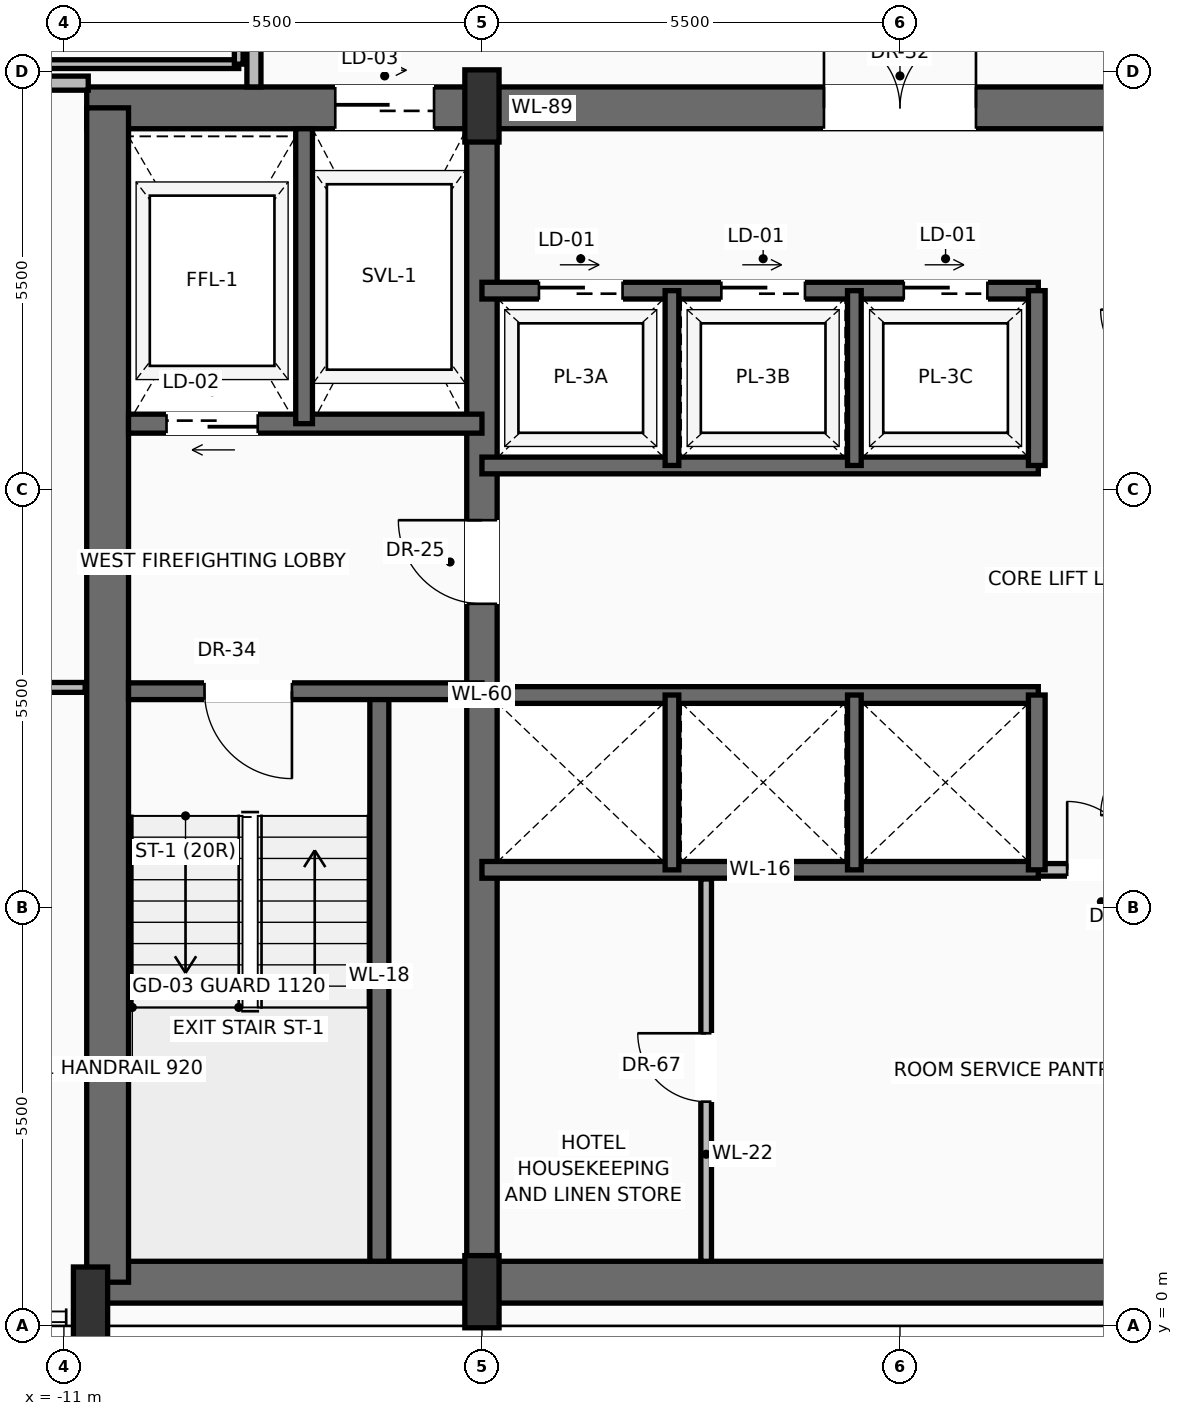
"""IFC4 building model, lengths in metres.
Left out: names, types, materials, properties, quantities, classifications, styles, units other than length and angle.
Written with IfcOpenShell. Run it as: python <this file> out.ifc"""

import sys

from ifc_helpers import new_model, si_unit, direction, frame, frame_2d, origin, origin_2d, place, context, subcontext, project, spatial, rectangle, extrude, source, transform, mapped, element, fill, save


model = new_model("IFC4")
c1 = context("Model", 3, precision=1e-05, world=origin(), true_north=direction((0.0, 1.0)))
c2 = subcontext(c1, "Body", "Model", "MODEL_VIEW")
j1 = project(units=[si_unit("LENGTHUNIT", "METRE"), si_unit("PLANEANGLEUNIT", "RADIAN")], contexts=[c1])
p1 = place(None, origin())
s1 = spatial("IfcSite", under=j1, at=p1, CompositionType="ELEMENT")
p2 = place(p1, origin())
s2 = spatial("IfcBuilding", under=s1, at=p2, CompositionType="ELEMENT")
p3 = place(p2, frame((0.0, 0.0, 220.0)))
s3 = spatial("IfcBuildingStorey", under=s2, at=p3, CompositionType="ELEMENT", Elevation=220.0)
p4 = place(p3, frame((-10.65, 0.575, 0.0), z_axis=(0.0, 0.0, 1.0), x_axis=(1.0, 0.0, 0.0)))
e1 = element("IfcWall", 1, at=p4, inside=s3, PredefinedType="SHEAR", context=c2, shape_type="SweptSolid", body=[
    extrude(rectangle(XDim=21.3, YDim=0.55, at=frame_2d((10.65, 0.0))), origin(), (0.0, 0.0, 1.0), 3.24),
])
p5 = place(p3, frame((-10.7, 16.025, 0.0), z_axis=(0.0, 0.0, 1.0), x_axis=(1.0, 0.0, 0.0)))
e2 = element("IfcWall", 2, at=p5, inside=s3, PredefinedType="SHEAR", context=c2, shape_type="SweptSolid", body=[
    extrude(rectangle(XDim=21.4, YDim=0.55, at=frame_2d((10.7, 0.0))), origin(), (0.0, 0.0, 1.0), 3.24),
])
p6 = place(p5, frame((3.27, 0.0, 0.0)))
e3 = element("IfcOpeningElement", 3, at=p6, cuts=e2, PredefinedType="OPENING", context=c2, shape_type="SweptSolid", body=[
    extrude(rectangle(XDim=1.3, YDim=2.3, at=frame_2d((0.65, 1.15))), frame((0.0, 0.285, 0.0), z_axis=(0.0, -1.0, 0.0), x_axis=(1.0, 0.0, 0.0)), (0.0, 0.0, 1.0), 0.57),
])
p7 = place(p5, frame((9.7, 0.0, 0.0)))
e4 = element("IfcOpeningElement", 4, at=p7, cuts=e2, PredefinedType="OPENING", context=c2, shape_type="SweptSolid", body=[
    extrude(rectangle(XDim=2.0, YDim=2.4, at=frame_2d((1.0, 1.2))), frame((0.0, 0.285, 0.0), z_axis=(0.0, -1.0, 0.0), x_axis=(1.0, 0.0, 0.0)), (0.0, 0.0, 1.0), 0.57),
])
p8 = place(p3, frame((-10.425, 0.575, 0.0), z_axis=(0.0, 0.0, 1.0), x_axis=(0.0, 1.0, 0.0)))
e5 = element("IfcWall", 5, at=p8, inside=s3, PredefinedType="SHEAR", context=c2, shape_type="SweptSolid", body=[
    extrude(rectangle(XDim=15.45, YDim=0.55, at=frame_2d((7.725, 0.0))), origin(), (0.0, 0.0, 1.0), 3.24),
])
p9 = place(p3, frame((-5.5, 0.575, 0.0), z_axis=(0.0, 0.0, 1.0), x_axis=(0.0, 1.0, 0.0)))
e6 = element("IfcWall", 6, at=p9, inside=s3, PredefinedType="SHEAR", context=c2, shape_type="SweptSolid", body=[
    extrude(rectangle(XDim=15.45, YDim=0.4, at=frame_2d((7.725, 0.0))), origin(), (0.0, 0.0, 1.0), 3.24),
])
p10 = place(p9, frame((8.925, 0.0, 0.0)))
e7 = element("IfcOpeningElement", 7, at=p10, cuts=e6, PredefinedType="OPENING", context=c2, shape_type="SweptSolid", body=[
    extrude(rectangle(XDim=1.1, YDim=2.2, at=frame_2d((0.55, 1.1))), frame((0.0, 0.21, 0.0), z_axis=(0.0, -1.0, 0.0), x_axis=(1.0, 0.0, 0.0)), (0.0, 0.0, 1.0), 0.42),
])
m1 = source(origin(), c2, "Body", "SweptSolid", [
    extrude(rectangle(XDim=0.45, YDim=0.95, at=origin_2d()), origin(), (0.0, 0.0, 1.0), 3.45),
])
for number, where, z_axis, x_axis in (
    (8, (-10.65, 0.3, 0.0), (0.0, 0.0, 1.0), (1.0, 0.0, 0.0)),
    (9, (-5.5, 0.45, 0.0), (0.0, 0.0, 1.0), (1.0, 0.0, 0.0)),
    (10, (-5.5, 16.05, 0.0), (0.0, 0.0, 1.0), (1.0, 0.0, 0.0)),
):
    element("IfcColumn", number, at=place(p3, frame(where, z_axis=z_axis, x_axis=x_axis)), inside=s3, PredefinedType="PILASTER", context=c2, shape_type="MappedRepresentation", body=[
        mapped(m1, transform((0.0, 0.0, 0.0), scale=1.0)),
    ])
p11 = place(p3, frame((-19.808, 15.546, 0.0), z_axis=(0.0, 0.0, 1.0), x_axis=(0.514354531287, 0.857577644382, 0.0)))
e11 = element("IfcWall", 11, at=p11, inside=s3, PredefinedType="SOLIDWALL", context=c2, shape_type="SweptSolid", body=[
    extrude(rectangle(XDim=19.322, YDim=0.28, at=frame_2d((9.661, 0.0))), origin(), (0.0, 0.0, 1.0), 2.82),
])
p12 = place(p11, frame((4.637, 0.0, 0.0)))
e12 = element("IfcOpeningElement", 12, at=p12, cuts=e11, PredefinedType="OPENING", context=c2, shape_type="SweptSolid", body=[
    extrude(rectangle(XDim=1.6, YDim=2.35, at=frame_2d((0.8, 1.175))), frame((0.0, 0.15, 0.0), z_axis=(0.0, -1.0, 0.0), x_axis=(1.0, 0.0, 0.0)), (0.0, 0.0, 1.0), 0.3),
])
p13 = place(p11, frame((13.139, 0.0, 0.9)))
e13 = element("IfcOpeningElement", 13, at=p13, cuts=e11, PredefinedType="OPENING", context=c2, shape_type="SweptSolid", body=[
    extrude(rectangle(XDim=2.0, YDim=1.75, at=frame_2d((1.0, 0.875))), frame((0.0, 0.15, 0.0), z_axis=(0.0, -1.0, 0.0), x_axis=(1.0, 0.0, 0.0)), (0.0, 0.0, 1.0), 0.3),
])
p14 = place(p3, frame((-6.85, 0.85, 0.0), z_axis=(0.0, 0.0, 1.0), x_axis=(0.0, 1.0, 0.0)))
e14 = element("IfcWall", 14, at=p14, inside=s3, PredefinedType="SOLIDWALL", context=c2, shape_type="SweptSolid", body=[
    extrude(rectangle(XDim=7.5, YDim=0.25, at=frame_2d((3.75, 0.0))), origin(), (0.0, 0.0, 1.0), 3.24),
])
p15 = place(p3, frame((-5.5, 8.35, 0.0), z_axis=(0.0, 0.0, 1.0), x_axis=(-1.0, 0.0, 0.0)))
e15 = element("IfcWall", 15, at=p15, inside=s3, PredefinedType="SOLIDWALL", context=c2, shape_type="SweptSolid", body=[
    extrude(rectangle(XDim=4.65, YDim=0.22, at=frame_2d((2.325, 0.0))), origin(), (0.0, 0.0, 1.0), 3.24),
])
p16 = place(p15, frame((2.5, 0.0, 0.0)))
e16 = element("IfcOpeningElement", 16, at=p16, cuts=e15, PredefinedType="OPENING", context=c2, shape_type="SweptSolid", body=[
    extrude(rectangle(XDim=1.15, YDim=2.2, at=frame_2d((0.575, 1.1))), frame((0.0, 0.12, 0.0), z_axis=(0.0, -1.0, 0.0), x_axis=(1.0, 0.0, 0.0)), (0.0, 0.0, 1.0), 0.24),
])
p17 = place(p3, frame((-5.5, 11.87, 0.0), z_axis=(0.0, 0.0, 1.0), x_axis=(-1.0, 0.0, 0.0)))
e17 = element("IfcWall", 17, at=p17, inside=s3, PredefinedType="SOLIDWALL", context=c2, shape_type="SweptSolid", body=[
    extrude(rectangle(XDim=4.65, YDim=0.25, at=frame_2d((2.325, 0.0))), origin(), (0.0, 0.0, 1.0), 3.24),
])
p18 = place(p17, frame((2.95, 0.0, 0.0)))
e18 = element("IfcOpeningElement", 18, at=p18, cuts=e17, PredefinedType="OPENING", context=c2, shape_type="SweptSolid", body=[
    extrude(rectangle(XDim=1.2, YDim=2.25, at=frame_2d((0.6, 1.125))), frame((0.0, 0.135, 0.0), z_axis=(0.0, -1.0, 0.0), x_axis=(1.0, 0.0, 0.0)), (0.0, 0.0, 1.0), 0.27),
])
p19 = place(p3, frame((-7.84, 11.87, 0.0), z_axis=(0.0, 0.0, 1.0), x_axis=(0.0, 1.0, 0.0)))
e19 = element("IfcWall", 19, at=p19, inside=s3, PredefinedType="SOLIDWALL", context=c2, shape_type="SweptSolid", body=[
    extrude(rectangle(XDim=3.88, YDim=0.22, at=frame_2d((1.94, 0.0))), origin(), (0.0, 0.0, 1.0), 3.24),
])
p20 = place(p3, frame((1.82, 6.0, 0.0), z_axis=(0.0, 0.0, 1.0), x_axis=(1.0, 0.0, 0.0)))
e20 = element("IfcWall", 20, at=p20, inside=s3, PredefinedType="PARTITIONING", context=c2, shape_type="SweptSolid", body=[
    extrude(rectangle(XDim=3.48, YDim=0.165, at=frame_2d((1.74, 0.0))), origin(), (0.0, 0.0, 1.0), 3.232),
])
p21 = place(p20, frame((0.38, 0.0, 0.0)))
e21 = element("IfcOpeningElement", 21, at=p21, cuts=e20, PredefinedType="OPENING", context=c2, shape_type="SweptSolid", body=[
    extrude(rectangle(XDim=0.9, YDim=2.1, at=frame_2d((0.45, 1.05))), frame((0.0, 0.093, 0.0), z_axis=(0.0, -1.0, 0.0), x_axis=(1.0, 0.0, 0.0)), (0.0, 0.0, 1.0), 0.185),
])
p22 = place(p3, frame((-2.55, 0.85, 0.0), z_axis=(0.0, 0.0, 1.0), x_axis=(0.0, 1.0, 0.0)))
e22 = element("IfcWall", 22, at=p22, inside=s3, PredefinedType="PARTITIONING", context=c2, shape_type="SweptSolid", body=[
    extrude(rectangle(XDim=5.03, YDim=0.14, at=frame_2d((2.515, 0.0))), origin(), (0.0, 0.0, 1.0), 3.232),
])
p23 = place(p22, frame((2.1, 0.0, 0.0)))
e23 = element("IfcOpeningElement", 23, at=p23, cuts=e22, PredefinedType="OPENING", context=c2, shape_type="SweptSolid", body=[
    extrude(rectangle(XDim=0.9, YDim=2.1, at=frame_2d((0.45, 1.05))), frame((0.0, 0.08, 0.0), z_axis=(0.0, -1.0, 0.0), x_axis=(1.0, 0.0, 0.0)), (0.0, 0.0, 1.0), 0.16),
])
for number, where, z_axis, x_axis in (
    (24, (-5.5, 6.0, 0.0), (0.0, 0.0, 1.0), (1.0, 0.0, 0.0)),
    (25, (-5.5, 8.3, 0.0), (0.0, 0.0, 1.0), (1.0, 0.0, 0.0)),
):
    element("IfcWall", number, at=place(p3, frame(where, z_axis=z_axis, x_axis=x_axis)), inside=s3, PredefinedType="SOLIDWALL", context=c2, shape_type="SweptSolid", body=[
        extrude(rectangle(XDim=7.32, YDim=0.22, at=frame_2d((3.66, 0.0))), origin(), (0.0, 0.0, 1.0), 3.24),
    ])
p24 = place(p3, frame((1.8, 6.0, 0.0), z_axis=(0.0, 0.0, 1.0), x_axis=(0.0, 1.0, 0.0)))
e26 = element("IfcWall", 26, at=p24, inside=s3, PredefinedType="SOLIDWALL", context=c2, shape_type="SweptSolid", body=[
    extrude(rectangle(XDim=2.3, YDim=0.22, at=frame_2d((1.15, 0.0))), origin(), (0.0, 0.0, 1.0), 3.24),
])
for number, where, z_axis, x_axis in (
    (27, (-3.0, 6.0, 0.0), (0.0, 0.0, 1.0), (0.0, 1.0, 0.0)),
    (28, (-0.6, 6.0, 0.0), (0.0, 0.0, 1.0), (0.0, 1.0, 0.0)),
):
    element("IfcWall", number, at=place(p3, frame(where, z_axis=z_axis, x_axis=x_axis)), inside=s3, PredefinedType="SOLIDWALL", context=c2, shape_type="SweptSolid", body=[
        extrude(rectangle(XDim=2.3, YDim=0.18, at=frame_2d((1.15, 0.0))), origin(), (0.0, 0.0, 1.0), 3.24),
    ])
p25 = place(p3, frame((-5.5, 11.32, 0.0), z_axis=(0.0, 0.0, 1.0), x_axis=(1.0, 0.0, 0.0)))
e29 = element("IfcWall", 29, at=p25, inside=s3, PredefinedType="SOLIDWALL", context=c2, shape_type="SweptSolid", body=[
    extrude(rectangle(XDim=7.32, YDim=0.22, at=frame_2d((3.66, 0.0))), origin(), (0.0, 0.0, 1.0), 3.24),
])
p26 = place(p3, frame((-5.5, 13.62, 0.0), z_axis=(0.0, 0.0, 1.0), x_axis=(1.0, 0.0, 0.0)))
e30 = element("IfcWall", 30, at=p26, inside=s3, PredefinedType="SOLIDWALL", context=c2, shape_type="SweptSolid", body=[
    extrude(rectangle(XDim=7.32, YDim=0.22, at=frame_2d((3.66, 0.0))), origin(), (0.0, 0.0, 1.0), 3.24),
])
p27 = place(p26, frame((0.75, 0.0, 0.0)))
e31 = element("IfcOpeningElement", 31, at=p27, cuts=e30, PredefinedType="OPENING", context=c2, shape_type="SweptSolid", body=[
    extrude(rectangle(XDim=1.1, YDim=2.2, at=frame_2d((0.55, 1.1))), frame((0.0, 0.12, 0.0), z_axis=(0.0, -1.0, 0.0), x_axis=(1.0, 0.0, 0.0)), (0.0, 0.0, 1.0), 0.24),
])
p28 = place(p26, frame((3.15, 0.0, 0.0)))
e32 = element("IfcOpeningElement", 32, at=p28, cuts=e30, PredefinedType="OPENING", context=c2, shape_type="SweptSolid", body=[
    extrude(rectangle(XDim=1.1, YDim=2.2, at=frame_2d((0.55, 1.1))), frame((0.0, 0.12, 0.0), z_axis=(0.0, -1.0, 0.0), x_axis=(1.0, 0.0, 0.0)), (0.0, 0.0, 1.0), 0.24),
])
p29 = place(p26, frame((5.55, 0.0, 0.0)))
e33 = element("IfcOpeningElement", 33, at=p29, cuts=e30, PredefinedType="OPENING", context=c2, shape_type="SweptSolid", body=[
    extrude(rectangle(XDim=1.1, YDim=2.2, at=frame_2d((0.55, 1.1))), frame((0.0, 0.12, 0.0), z_axis=(0.0, -1.0, 0.0), x_axis=(1.0, 0.0, 0.0)), (0.0, 0.0, 1.0), 0.24),
])
p30 = place(p3, frame((1.8, 11.32, 0.0), z_axis=(0.0, 0.0, 1.0), x_axis=(0.0, 1.0, 0.0)))
e34 = element("IfcWall", 34, at=p30, inside=s3, PredefinedType="SOLIDWALL", context=c2, shape_type="SweptSolid", body=[
    extrude(rectangle(XDim=2.3, YDim=0.22, at=frame_2d((1.15, 0.0))), origin(), (0.0, 0.0, 1.0), 3.24),
])
for number, where, z_axis, x_axis in (
    (35, (-3.0, 11.32, 0.0), (0.0, 0.0, 1.0), (0.0, 1.0, 0.0)),
    (36, (-0.6, 11.32, 0.0), (0.0, 0.0, 1.0), (0.0, 1.0, 0.0)),
):
    element("IfcWall", number, at=place(p3, frame(where, z_axis=z_axis, x_axis=x_axis)), inside=s3, PredefinedType="SOLIDWALL", context=c2, shape_type="SweptSolid", body=[
        extrude(rectangle(XDim=2.3, YDim=0.18, at=frame_2d((1.15, 0.0))), origin(), (0.0, 0.0, 1.0), 3.24),
    ])
p31 = place(p3, frame((-8.5, 16.3, 0.0), z_axis=(0.0, 0.0, 1.0), x_axis=(0.0, 1.0, 0.0)))
e37 = element("IfcWall", 37, at=p31, inside=s3, PredefinedType="PARTITIONING", context=c2, shape_type="SweptSolid", body=[
    extrude(rectangle(XDim=13.3, YDim=0.185, at=frame_2d((6.65, 0.0))), origin(), (0.0, 0.0, 1.0), 3.232),
])
p32 = place(p31, frame((3.136, 0.0, 0.0)))
e38 = element("IfcOpeningElement", 38, at=p32, cuts=e37, PredefinedType="OPENING", context=c2, shape_type="SweptSolid", body=[
    extrude(rectangle(XDim=1.05, YDim=2.25, at=frame_2d((0.525, 1.125))), frame((0.0, 0.103, 0.0), z_axis=(0.0, -1.0, 0.0), x_axis=(1.0, 0.0, 0.0)), (0.0, 0.0, 1.0), 0.205),
])
p33 = place(p31, frame((9.256, 0.0, 0.0)))
e39 = element("IfcOpeningElement", 39, at=p33, cuts=e37, PredefinedType="OPENING", context=c2, shape_type="SweptSolid", body=[
    extrude(rectangle(XDim=1.05, YDim=2.25, at=frame_2d((0.525, 1.125))), frame((0.0, 0.103, 0.0), z_axis=(0.0, -1.0, 0.0), x_axis=(1.0, 0.0, 0.0)), (0.0, 0.0, 1.0), 0.205),
])
p34 = place(p3, frame((-19.478, 16.35, 0.0), z_axis=(0.0, 0.0, 1.0), x_axis=(1.0, 0.0, 0.0)))
e40 = element("IfcWall", 40, at=p34, inside=s3, PredefinedType="PARTITIONING", context=c2, shape_type="SweptSolid", body=[
    extrude(rectangle(XDim=8.798, YDim=0.185, at=frame_2d((4.399, 0.0))), origin(), (0.0, 0.0, 1.0), 3.232),
])
p35 = place(p34, frame((5.092, 0.0, 0.0)))
e41 = element("IfcOpeningElement", 41, at=p35, cuts=e40, PredefinedType="OPENING", context=c2, shape_type="SweptSolid", body=[
    extrude(rectangle(XDim=1.05, YDim=2.25, at=frame_2d((0.525, 1.125))), frame((0.0, 0.103, 0.0), z_axis=(0.0, -1.0, 0.0), x_axis=(1.0, 0.0, 0.0)), (0.0, 0.0, 1.0), 0.205),
])
p36 = place(p3, frame((-24.246, 8.4, 0.0), z_axis=(0.0, 0.0, 1.0), x_axis=(1.0, 0.0, 0.0)))
e42 = element("IfcWall", 42, at=p36, inside=s3, PredefinedType="PARTITIONING", context=c2, shape_type="SweptSolid", body=[
    extrude(rectangle(XDim=13.526, YDim=0.13, at=frame_2d((6.763, 0.0))), origin(), (0.0, 0.0, 1.0), 3.232),
])
p37 = place(p36, frame((5.646, 0.0, 0.0)))
e43 = element("IfcOpeningElement", 43, at=p37, cuts=e42, PredefinedType="OPENING", context=c2, shape_type="SweptSolid", body=[
    extrude(rectangle(XDim=0.95, YDim=2.2, at=frame_2d((0.475, 1.1))), frame((0.0, 0.075, 0.0), z_axis=(0.0, -1.0, 0.0), x_axis=(1.0, 0.0, 0.0)), (0.0, 0.0, 1.0), 0.15),
])
p38 = place(p3, frame((-11.35, 16.6, 0.0), z_axis=(0.0, 0.0, 1.0), x_axis=(1.0, 0.0, 0.0)))
e44 = element("IfcWall", 44, at=p38, inside=s3, PredefinedType="PARTITIONING", context=c2, shape_type="SweptSolid", body=[
    extrude(rectangle(XDim=2.65, YDim=0.115, at=frame_2d((1.325, 0.0))), origin(), (0.0, 0.0, 1.0), 3.232),
])
p39 = place(p3, frame((-8.7, 16.6, 0.0), z_axis=(0.0, 0.0, 1.0), x_axis=(0.0, 1.0, 0.0)))
e45 = element("IfcWall", 45, at=p39, inside=s3, PredefinedType="PARTITIONING", context=c2, shape_type="SweptSolid", body=[
    extrude(rectangle(XDim=2.4, YDim=0.115, at=frame_2d((1.2, 0.0))), origin(), (0.0, 0.0, 1.0), 3.232),
])
m2 = source(origin(), c2, "Body", "SweptSolid", [
    extrude(rectangle(XDim=1.15, YDim=2.2, at=frame_2d((0.575, 1.1))), frame((0.0, 0.025, 0.0), z_axis=(0.0, -1.0, 0.0), x_axis=(1.0, 0.0, 0.0)), (0.0, 0.0, 1.0), 0.05),
])
p40 = place(p16, origin())
e46 = element("IfcDoor", 46, at=p40, inside=s3, OperationType="SINGLE_SWING_LEFT", PredefinedType="DOOR", context=c2, shape_type="MappedRepresentation", body=[
    mapped(m2, transform((0.0, 0.0, 0.0), scale=1.0)),
])
fill(e16, e46)
m3 = source(origin(), c2, "Body", "SweptSolid", [
    extrude(rectangle(XDim=1.1, YDim=2.2, at=frame_2d((0.55, 1.1))), frame((0.0, 0.025, 0.0), z_axis=(0.0, -1.0, 0.0), x_axis=(1.0, 0.0, 0.0)), (0.0, 0.0, 1.0), 0.05),
])
p41 = place(p10, origin())
e47 = element("IfcDoor", 47, at=p41, inside=s3, OperationType="SINGLE_SWING_RIGHT", PredefinedType="DOOR", context=c2, shape_type="MappedRepresentation", body=[
    mapped(m3, transform((0.0, 0.0, 0.0), scale=1.0)),
])
fill(e7, e47)
m4 = source(origin(), c2, "Body", "SweptSolid", [
    extrude(rectangle(XDim=1.2, YDim=2.25, at=frame_2d((0.6, 1.125))), frame((0.0, 0.025, 0.0), z_axis=(0.0, -1.0, 0.0), x_axis=(1.0, 0.0, 0.0)), (0.0, 0.0, 1.0), 0.05),
])
p42 = place(p18, origin())
e48 = element("IfcDoor", 48, at=p42, inside=s3, OperationType="SLIDING_TO_LEFT", PredefinedType="DOOR", context=c2, shape_type="MappedRepresentation", body=[
    mapped(m4, transform((0.0, 0.0, 0.0), scale=1.0)),
])
fill(e18, e48)
m5 = source(origin(), c2, "Body", "SweptSolid", [
    extrude(rectangle(XDim=1.3, YDim=2.3, at=frame_2d((0.65, 1.15))), frame((0.0, 0.025, 0.0), z_axis=(0.0, -1.0, 0.0), x_axis=(1.0, 0.0, 0.0)), (0.0, 0.0, 1.0), 0.05),
])
p43 = place(p6, origin())
e49 = element("IfcDoor", 49, at=p43, inside=s3, OperationType="SLIDING_TO_RIGHT", PredefinedType="DOOR", context=c2, shape_type="MappedRepresentation", body=[
    mapped(m5, transform((0.0, 0.0, 0.0), scale=1.0)),
])
fill(e3, e49)
m6 = source(origin(), c2, "Body", "SweptSolid", [
    extrude(rectangle(XDim=2.0, YDim=2.4, at=frame_2d((1.0, 1.2))), frame((0.0, 0.025, 0.0), z_axis=(0.0, -1.0, 0.0), x_axis=(1.0, 0.0, 0.0)), (0.0, 0.0, 1.0), 0.05),
])
p44 = place(p7, origin())
e50 = element("IfcDoor", 50, at=p44, inside=s3, OperationType="DOUBLE_DOOR_SINGLE_SWING", PredefinedType="DOOR", context=c2, shape_type="MappedRepresentation", body=[
    mapped(m6, transform((0.0, 0.0, 0.0), scale=1.0)),
])
fill(e4, e50)
m7 = source(origin(), c2, "Body", "SweptSolid", [
    extrude(rectangle(XDim=0.9, YDim=2.1, at=frame_2d((0.45, 1.05))), frame((0.0, 0.025, 0.0), z_axis=(0.0, -1.0, 0.0), x_axis=(1.0, 0.0, 0.0)), (0.0, 0.0, 1.0), 0.05),
])
p45 = place(p21, origin())
e51 = element("IfcDoor", 51, at=p45, inside=s3, OperationType="SINGLE_SWING_LEFT", PredefinedType="DOOR", context=c2, shape_type="MappedRepresentation", body=[
    mapped(m7, transform((0.0, 0.0, 0.0), scale=1.0)),
])
fill(e21, e51)
p46 = place(p23, origin())
e52 = element("IfcDoor", 52, at=p46, inside=s3, OperationType="SINGLE_SWING_RIGHT", PredefinedType="DOOR", context=c2, shape_type="MappedRepresentation", body=[
    mapped(m7, transform((0.0, 0.0, 0.0), scale=1.0)),
])
fill(e23, e52)
m8 = source(origin(), c2, "Body", "SweptSolid", [
    extrude(rectangle(XDim=1.1, YDim=2.2, at=frame_2d((0.55, 1.1))), frame((0.0, 0.025, 0.0), z_axis=(0.0, -1.0, 0.0), x_axis=(1.0, 0.0, 0.0)), (0.0, 0.0, 1.0), 0.05),
])
p47 = place(p27, origin())
e53 = element("IfcDoor", 53, at=p47, inside=s3, OperationType="SLIDING_TO_RIGHT", PredefinedType="DOOR", context=c2, shape_type="MappedRepresentation", body=[
    mapped(m8, transform((0.0, 0.0, 0.0), scale=1.0)),
])
fill(e31, e53)
p48 = place(p28, origin())
e54 = element("IfcDoor", 54, at=p48, inside=s3, OperationType="SLIDING_TO_RIGHT", PredefinedType="DOOR", context=c2, shape_type="MappedRepresentation", body=[
    mapped(m8, transform((0.0, 0.0, 0.0), scale=1.0)),
])
fill(e32, e54)
p49 = place(p29, origin())
e55 = element("IfcDoor", 55, at=p49, inside=s3, OperationType="SLIDING_TO_RIGHT", PredefinedType="DOOR", context=c2, shape_type="MappedRepresentation", body=[
    mapped(m8, transform((0.0, 0.0, 0.0), scale=1.0)),
])
fill(e33, e55)
save(model, sys.argv[1])
